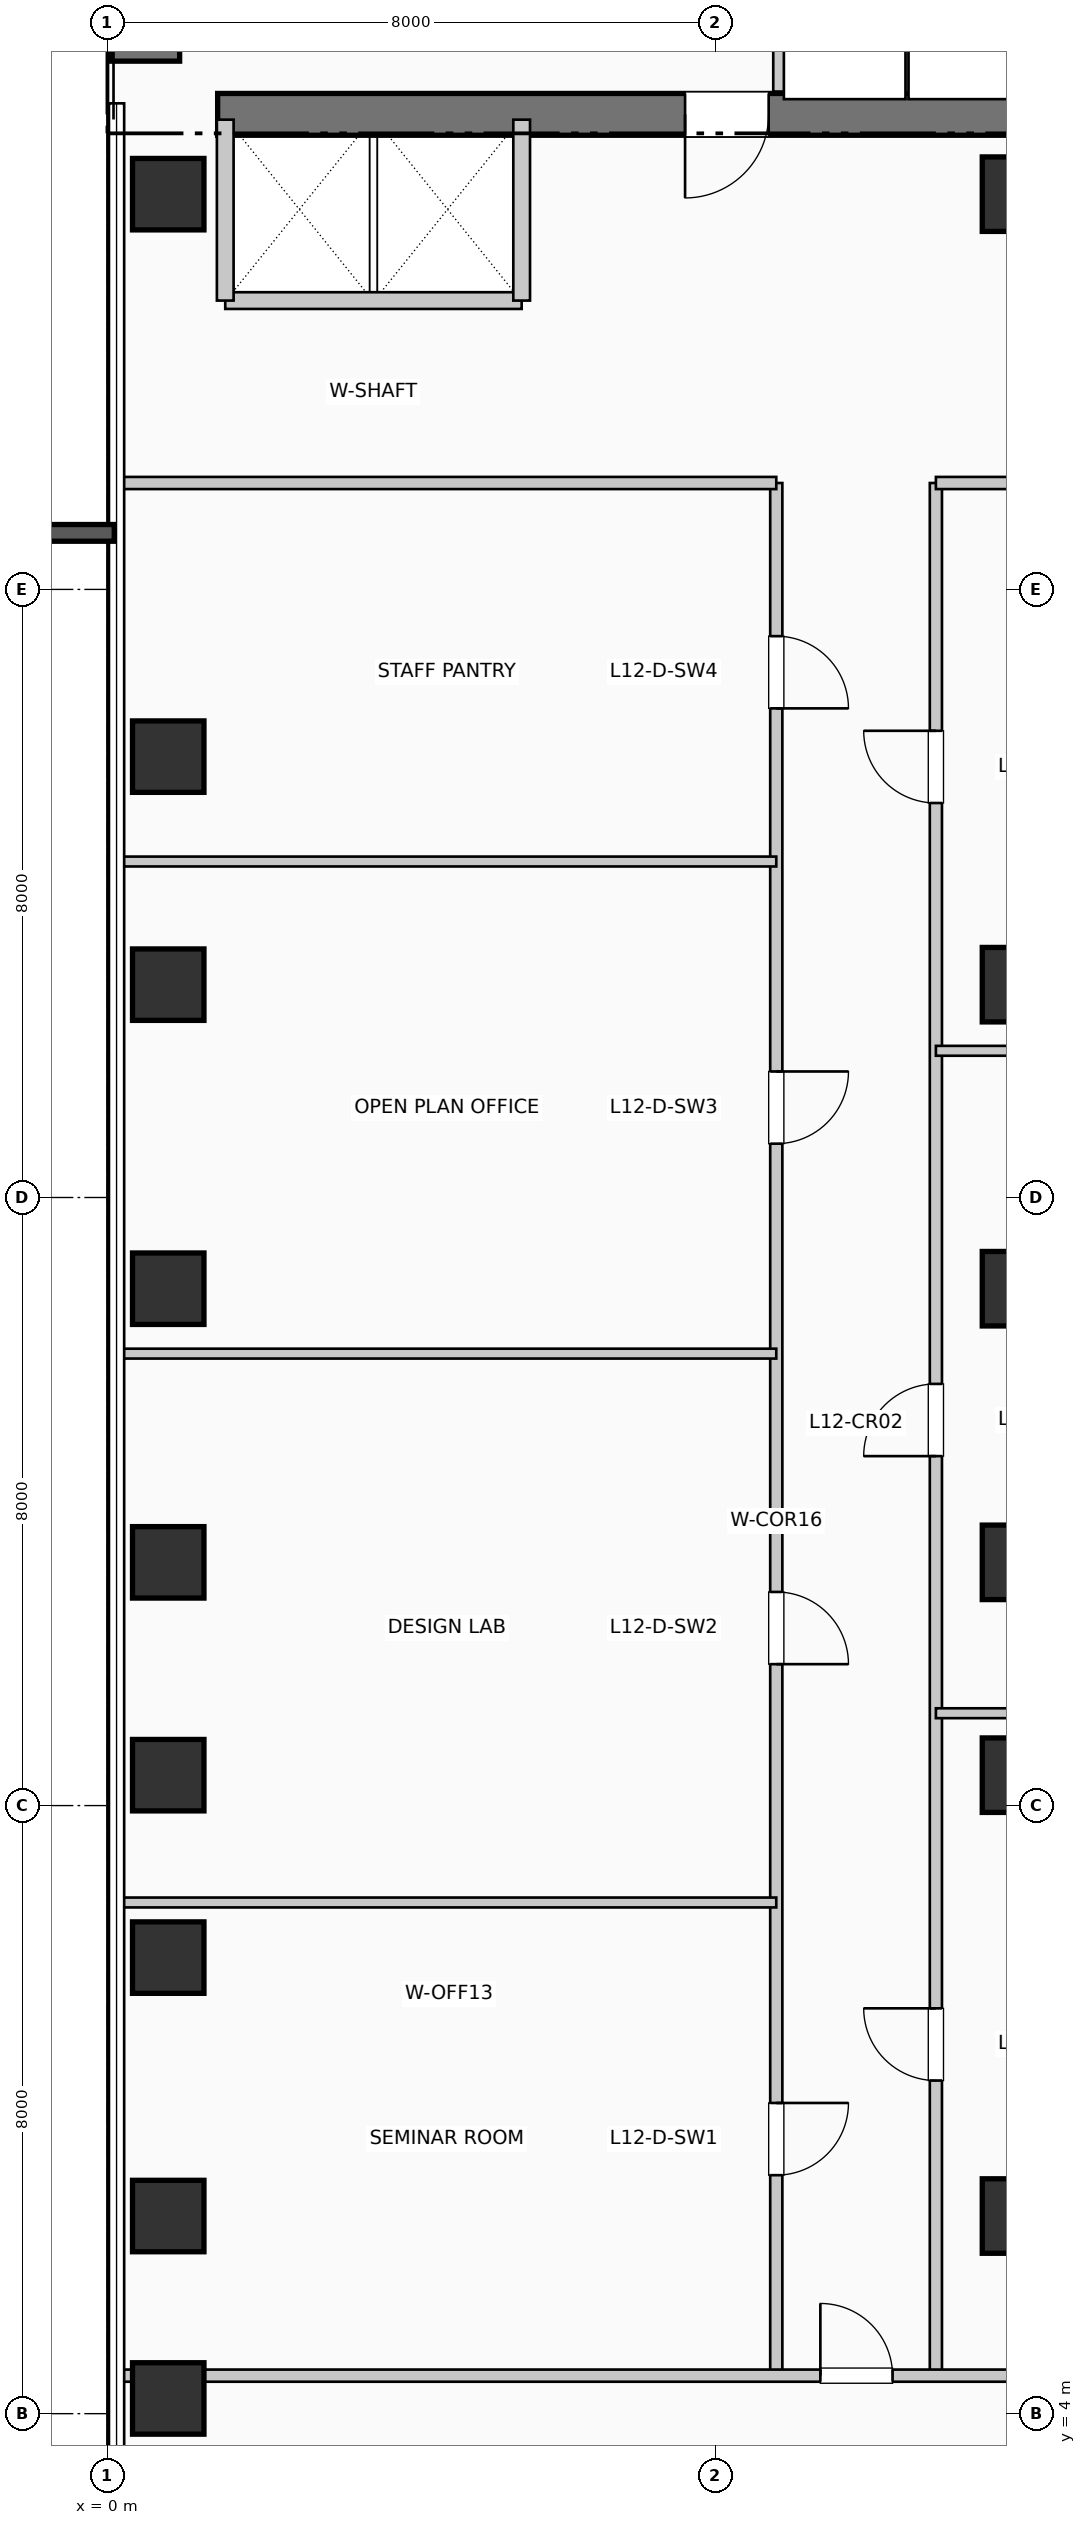
"""IFC4 building model, lengths in metres.
Left out: names, types, materials, properties, quantities, classifications, styles, units other than length and angle.
Written with IfcOpenShell. Run it as: python <this file> out.ifc"""

import sys

from ifc_helpers import new_model, si_unit, direction, frame, frame_2d, origin, origin_2d, place, context, subcontext, project, spatial, rectangle, extrude, element, fill, save


model = new_model("IFC4")
c1 = context("Model", 3, precision=1e-05, world=origin(), true_north=direction((0.0, 1.0)))
c2 = subcontext(c1, "Body", "Model", "MODEL_VIEW")
j1 = project(units=[si_unit("LENGTHUNIT", "METRE"), si_unit("PLANEANGLEUNIT", "RADIAN")], contexts=[c1])
p1 = place(None, origin())
s1 = spatial("IfcSite", under=j1, at=p1, CompositionType="ELEMENT")
p2 = place(p1, origin())
s2 = spatial("IfcBuilding", under=s1, at=p2, CompositionType="ELEMENT")
p3 = place(p2, frame((0.0, 0.0, 54.12)))
s3 = spatial("IfcBuildingStorey", under=s2, at=p3, CompositionType="ELEMENT", Elevation=54.12)
p4 = place(p3, frame((0.5, 34.95, 0.0), z_axis=(0.0, 0.0, 1.0), x_axis=(0.0, 1.0, 0.0)))
e1 = element("IfcWall", 1, at=p4, inside=s3, PredefinedType="SHEAR", context=c2, shape_type="SweptSolid", body=[
    extrude(rectangle(XDim=7.9, YDim=0.9, at=frame_2d((3.95, 0.0))), origin(), (0.0, 0.0, 1.0), 3.96),
])
p5 = place(p3, frame((1.45, 34.25, 0.0), z_axis=(0.0, 0.0, 1.0), x_axis=(1.0, 0.0, 0.0)))
e2 = element("IfcWall", 2, at=p5, inside=s3, PredefinedType="SHEAR", context=c2, shape_type="SweptSolid", body=[
    extrude(rectangle(XDim=10.71, YDim=0.55, at=frame_2d((5.355, 0.0))), origin(), (0.0, 0.0, 1.0), 3.96),
])
p6 = place(p5, frame((7.25, 0.0, 0.0), z_axis=(0.0, 0.0, 1.0), x_axis=(-1.0, 0.0, 0.0)))
e3 = element("IfcOpeningElement", 3, at=p6, cuts=e2, PredefinedType="OPENING", context=c2, shape_type="SweptSolid", body=[
    extrude(rectangle(XDim=1.1, YDim=2.15, at=frame_2d((0.55, 1.075))), frame((0.0, 0.285, 0.0), z_axis=(0.0, -1.0, 0.0), x_axis=(1.0, 0.0, 0.0)), (0.0, 0.0, 1.0), 0.57),
])
for number, where, z_axis, x_axis in (
    (4, (0.8, 4.2, 0.0), (0.0, 0.0, 1.0), (1.0, 0.0, 0.0)),
    (5, (0.8, 6.6, 0.0), (0.0, 0.0, 1.0), (1.0, 0.0, 0.0)),
    (6, (0.8, 10.0, 0.0), (0.0, 0.0, 1.0), (1.0, 0.0, 0.0)),
    (7, (0.8, 12.4, 0.0), (0.0, 0.0, 1.0), (1.0, 0.0, 0.0)),
    (8, (0.8, 15.2, 0.0), (0.0, 0.0, 1.0), (1.0, 0.0, 0.0)),
    (9, (0.8, 18.8, 0.0), (0.0, 0.0, 1.0), (1.0, 0.0, 0.0)),
    (10, (0.8, 22.8, 0.0), (0.0, 0.0, 1.0), (1.0, 0.0, 0.0)),
    (11, (0.8, 25.8, 0.0), (0.0, 0.0, 1.0), (1.0, 0.0, 0.0)),
    (12, (0.8, 33.2, 0.0), (0.0, 0.0, 1.0), (1.0, 0.0, 0.0)),
):
    element("IfcColumn", number, at=place(p3, frame(where, z_axis=z_axis, x_axis=x_axis)), inside=s3, PredefinedType="COLUMN", context=c2, shape_type="SweptSolid", body=[
        extrude(rectangle(XDim=0.94, YDim=0.94, at=origin_2d()), origin(), (0.0, 0.0, 1.0), 3.96),
    ])
for number, where, z_axis, x_axis in (
    (13, (12.0, 6.6, 0.0), (0.0, 0.0, 1.0), (1.0, 0.0, 0.0)),
    (14, (12.0, 12.4, 0.0), (0.0, 0.0, 1.0), (1.0, 0.0, 0.0)),
    (15, (12.0, 15.2, 0.0), (0.0, 0.0, 1.0), (1.0, 0.0, 0.0)),
    (16, (12.0, 18.8, 0.0), (0.0, 0.0, 1.0), (1.0, 0.0, 0.0)),
    (17, (12.0, 22.8, 0.0), (0.0, 0.0, 1.0), (1.0, 0.0, 0.0)),
    (18, (12.0, 33.2, 0.0), (0.0, 0.0, 1.0), (1.0, 0.0, 0.0)),
):
    element("IfcColumn", number, at=place(p3, frame(where, z_axis=z_axis, x_axis=x_axis)), inside=s3, PredefinedType="COLUMN", context=c2, shape_type="SweptSolid", body=[
        extrude(rectangle(XDim=0.98, YDim=0.98, at=origin_2d()), origin(), (0.0, 0.0, 1.0), 3.96),
    ])
p7 = place(p3, frame((8.86, 34.55, 0.0), z_axis=(0.0, 0.0, 1.0), x_axis=(0.0, 1.0, 0.0)))
e19 = element("IfcWall", 19, at=p7, inside=s3, PredefinedType="PARTITIONING", context=c2, shape_type="SweptSolid", body=[
    extrude(rectangle(XDim=2.5, YDim=0.2, at=frame_2d((1.25, 0.0))), origin(), (0.0, 0.0, 1.0), 3.71),
])
p8 = place(p3, frame((1.55, 31.8, 0.0), z_axis=(0.0, 0.0, 1.0), x_axis=(1.0, 0.0, 0.0)))
e20 = element("IfcWall", 20, at=p8, inside=s3, PredefinedType="PARTITIONING", context=c2, shape_type="SweptSolid", body=[
    extrude(rectangle(XDim=3.9, YDim=0.22, at=frame_2d((1.95, 0.0))), origin(), (0.0, 0.0, 1.0), 3.71),
])
for number, where, z_axis, x_axis in (
    (21, (1.55, 31.8, 0.0), (0.0, 0.0, 1.0), (0.0, 1.0, 0.0)),
    (22, (5.45, 31.8, 0.0), (0.0, 0.0, 1.0), (0.0, 1.0, 0.0)),
):
    element("IfcWall", number, at=place(p3, frame(where, z_axis=z_axis, x_axis=x_axis)), inside=s3, PredefinedType="PARTITIONING", context=c2, shape_type="SweptSolid", body=[
        extrude(rectangle(XDim=2.38, YDim=0.22, at=frame_2d((1.19, 0.0))), origin(), (0.0, 0.0, 1.0), 3.71),
    ])
p9 = place(p3, frame((8.8, 4.5, 0.0), z_axis=(0.0, 0.0, 1.0), x_axis=(0.0, 1.0, 0.0)))
e23 = element("IfcWall", 23, at=p9, inside=s3, PredefinedType="PARTITIONING", context=c2, shape_type="SweptSolid", body=[
    extrude(rectangle(XDim=24.9, YDim=0.16, at=frame_2d((12.45, 0.0))), origin(), (0.0, 0.0, 1.0), 3.71),
])
p10 = place(p9, frame((3.587, 0.0, 0.0), z_axis=(0.0, 0.0, 1.0), x_axis=(-1.0, 0.0, 0.0)))
e24 = element("IfcOpeningElement", 24, at=p10, cuts=e23, PredefinedType="OPENING", context=c2, shape_type="SweptSolid", body=[
    extrude(rectangle(XDim=0.95, YDim=2.15, at=frame_2d((0.475, 1.075))), frame((0.0, 0.09, 0.0), z_axis=(0.0, -1.0, 0.0), x_axis=(1.0, 0.0, 0.0)), (0.0, 0.0, 1.0), 0.18),
])
p11 = place(p9, frame((10.311, 0.0, 0.0), z_axis=(0.0, 0.0, 1.0), x_axis=(-1.0, 0.0, 0.0)))
e25 = element("IfcOpeningElement", 25, at=p11, cuts=e23, PredefinedType="OPENING", context=c2, shape_type="SweptSolid", body=[
    extrude(rectangle(XDim=0.95, YDim=2.15, at=frame_2d((0.475, 1.075))), frame((0.0, 0.09, 0.0), z_axis=(0.0, -1.0, 0.0), x_axis=(1.0, 0.0, 0.0)), (0.0, 0.0, 1.0), 0.18),
])
p12 = place(p9, frame((17.158, 0.0, 0.0), z_axis=(0.0, 0.0, 1.0), x_axis=(-1.0, 0.0, 0.0)))
e26 = element("IfcOpeningElement", 26, at=p12, cuts=e23, PredefinedType="OPENING", context=c2, shape_type="SweptSolid", body=[
    extrude(rectangle(XDim=0.95, YDim=2.15, at=frame_2d((0.475, 1.075))), frame((0.0, 0.09, 0.0), z_axis=(0.0, -1.0, 0.0), x_axis=(1.0, 0.0, 0.0)), (0.0, 0.0, 1.0), 0.18),
])
p13 = place(p9, frame((22.885, 0.0, 0.0), z_axis=(0.0, 0.0, 1.0), x_axis=(-1.0, 0.0, 0.0)))
e27 = element("IfcOpeningElement", 27, at=p13, cuts=e23, PredefinedType="OPENING", context=c2, shape_type="SweptSolid", body=[
    extrude(rectangle(XDim=0.95, YDim=2.15, at=frame_2d((0.475, 1.075))), frame((0.0, 0.09, 0.0), z_axis=(0.0, -1.0, 0.0), x_axis=(1.0, 0.0, 0.0)), (0.0, 0.0, 1.0), 0.18),
])
p14 = place(p3, frame((10.9, 4.5, 0.0), z_axis=(0.0, 0.0, 1.0), x_axis=(0.0, 1.0, 0.0)))
e28 = element("IfcWall", 28, at=p14, inside=s3, PredefinedType="PARTITIONING", context=c2, shape_type="SweptSolid", body=[
    extrude(rectangle(XDim=24.9, YDim=0.16, at=frame_2d((12.45, 0.0))), origin(), (0.0, 0.0, 1.0), 3.71),
])
p15 = place(p14, frame((3.883, 0.0, 0.0)))
e29 = element("IfcOpeningElement", 29, at=p15, cuts=e28, PredefinedType="OPENING", context=c2, shape_type="SweptSolid", body=[
    extrude(rectangle(XDim=0.95, YDim=2.15, at=frame_2d((0.475, 1.075))), frame((0.0, 0.09, 0.0), z_axis=(0.0, -1.0, 0.0), x_axis=(1.0, 0.0, 0.0)), (0.0, 0.0, 1.0), 0.18),
])
p16 = place(p14, frame((12.097, 0.0, 0.0)))
e30 = element("IfcOpeningElement", 30, at=p16, cuts=e28, PredefinedType="OPENING", context=c2, shape_type="SweptSolid", body=[
    extrude(rectangle(XDim=0.95, YDim=2.15, at=frame_2d((0.475, 1.075))), frame((0.0, 0.09, 0.0), z_axis=(0.0, -1.0, 0.0), x_axis=(1.0, 0.0, 0.0)), (0.0, 0.0, 1.0), 0.18),
])
p17 = place(p14, frame((20.69, 0.0, 0.0)))
e31 = element("IfcOpeningElement", 31, at=p17, cuts=e28, PredefinedType="OPENING", context=c2, shape_type="SweptSolid", body=[
    extrude(rectangle(XDim=0.95, YDim=2.15, at=frame_2d((0.475, 1.075))), frame((0.0, 0.09, 0.0), z_axis=(0.0, -1.0, 0.0), x_axis=(1.0, 0.0, 0.0)), (0.0, 0.0, 1.0), 0.18),
])
p18 = place(p3, frame((0.19, 4.5, 0.0), z_axis=(0.0, 0.0, 1.0), x_axis=(1.0, 0.0, 0.0)))
e32 = element("IfcWall", 32, at=p18, inside=s3, PredefinedType="PARTITIONING", context=c2, shape_type="SweptSolid", body=[
    extrude(rectangle(XDim=23.26, YDim=0.16, at=frame_2d((11.63, 0.0))), origin(), (0.0, 0.0, 1.0), 2.995),
])
p19 = place(p18, frame((9.19, 0.0, 0.0)))
e33 = element("IfcOpeningElement", 33, at=p19, cuts=e32, PredefinedType="OPENING", context=c2, shape_type="SweptSolid", body=[
    extrude(rectangle(XDim=0.95, YDim=2.15, at=frame_2d((0.475, 1.075))), frame((0.0, 0.09, 0.0), z_axis=(0.0, -1.0, 0.0), x_axis=(1.0, 0.0, 0.0)), (0.0, 0.0, 1.0), 0.18),
])
p20 = place(p3, frame((0.19, 29.4, 0.0), z_axis=(0.0, 0.0, 1.0), x_axis=(1.0, 0.0, 0.0)))
e34 = element("IfcWall", 34, at=p20, inside=s3, PredefinedType="PARTITIONING", context=c2, shape_type="SweptSolid", body=[
    extrude(rectangle(XDim=8.61, YDim=0.16, at=frame_2d((4.305, 0.0))), origin(), (0.0, 0.0, 1.0), 3.365),
])
p21 = place(p3, frame((10.9, 29.4, 0.0), z_axis=(0.0, 0.0, 1.0), x_axis=(1.0, 0.0, 0.0)))
e35 = element("IfcWall", 35, at=p21, inside=s3, PredefinedType="PARTITIONING", context=c2, shape_type="SweptSolid", body=[
    extrude(rectangle(XDim=12.55, YDim=0.16, at=frame_2d((6.275, 0.0))), origin(), (0.0, 0.0, 1.0), 3.365),
])
for number, where, z_axis, x_axis in (
    (36, (0.19, 10.725, 0.0), (0.0, 0.0, 1.0), (1.0, 0.0, 0.0)),
    (37, (0.19, 17.946, 0.0), (0.0, 0.0, 1.0), (1.0, 0.0, 0.0)),
    (38, (0.19, 24.42, 0.0), (0.0, 0.0, 1.0), (1.0, 0.0, 0.0)),
):
    element("IfcWall", number, at=place(p3, frame(where, z_axis=z_axis, x_axis=x_axis)), inside=s3, PredefinedType="PARTITIONING", context=c2, shape_type="SweptSolid", body=[
        extrude(rectangle(XDim=8.61, YDim=0.13, at=frame_2d((4.305, 0.0))), origin(), (0.0, 0.0, 1.0), 3.71),
    ])
for number, where, z_axis, x_axis in (
    (39, (10.9, 13.215, 0.0), (0.0, 0.0, 1.0), (1.0, 0.0, 0.0)),
    (40, (10.9, 21.93, 0.0), (0.0, 0.0, 1.0), (1.0, 0.0, 0.0)),
):
    element("IfcWall", number, at=place(p3, frame(where, z_axis=z_axis, x_axis=x_axis)), inside=s3, PredefinedType="PARTITIONING", context=c2, shape_type="SweptSolid", body=[
        extrude(rectangle(XDim=12.55, YDim=0.13, at=frame_2d((6.275, 0.0))), origin(), (0.0, 0.0, 1.0), 3.71),
    ])
p22 = place(p6, origin())
e41 = element("IfcDoor", 41, at=p22, inside=s3, OperationType="SINGLE_SWING_LEFT", PredefinedType="DOOR", context=c2, shape_type="SweptSolid", body=[
    extrude(rectangle(XDim=1.1, YDim=2.15, at=frame_2d((0.55, 1.075))), frame((0.0, 0.025, 0.0), z_axis=(0.0, -1.0, 0.0), x_axis=(1.0, 0.0, 0.0)), (0.0, 0.0, 1.0), 0.05),
])
fill(e3, e41)
p23 = place(p19, origin())
e42 = element("IfcDoor", 42, at=p23, inside=s3, OperationType="SINGLE_SWING_LEFT", PredefinedType="DOOR", context=c2, shape_type="SweptSolid", body=[
    extrude(rectangle(XDim=0.95, YDim=2.15, at=frame_2d((0.475, 1.075))), frame((0.0, 0.025, 0.0), z_axis=(0.0, -1.0, 0.0), x_axis=(1.0, 0.0, 0.0)), (0.0, 0.0, 1.0), 0.05),
])
fill(e33, e42)
p24 = place(p10, origin())
e43 = element("IfcDoor", 43, at=p24, inside=s3, OperationType="SINGLE_SWING_RIGHT", PredefinedType="DOOR", context=c2, shape_type="SweptSolid", body=[
    extrude(rectangle(XDim=0.95, YDim=2.15, at=frame_2d((0.475, 1.075))), frame((0.0, 0.025, 0.0), z_axis=(0.0, -1.0, 0.0), x_axis=(1.0, 0.0, 0.0)), (0.0, 0.0, 1.0), 0.05),
])
fill(e24, e43)
p25 = place(p11, origin())
e44 = element("IfcDoor", 44, at=p25, inside=s3, OperationType="SINGLE_SWING_LEFT", PredefinedType="DOOR", context=c2, shape_type="SweptSolid", body=[
    extrude(rectangle(XDim=0.95, YDim=2.15, at=frame_2d((0.475, 1.075))), frame((0.0, 0.025, 0.0), z_axis=(0.0, -1.0, 0.0), x_axis=(1.0, 0.0, 0.0)), (0.0, 0.0, 1.0), 0.05),
])
fill(e25, e44)
p26 = place(p12, origin())
e45 = element("IfcDoor", 45, at=p26, inside=s3, OperationType="SINGLE_SWING_RIGHT", PredefinedType="DOOR", context=c2, shape_type="SweptSolid", body=[
    extrude(rectangle(XDim=0.95, YDim=2.15, at=frame_2d((0.475, 1.075))), frame((0.0, 0.025, 0.0), z_axis=(0.0, -1.0, 0.0), x_axis=(1.0, 0.0, 0.0)), (0.0, 0.0, 1.0), 0.05),
])
fill(e26, e45)
p27 = place(p13, origin())
e46 = element("IfcDoor", 46, at=p27, inside=s3, OperationType="SINGLE_SWING_LEFT", PredefinedType="DOOR", context=c2, shape_type="SweptSolid", body=[
    extrude(rectangle(XDim=0.95, YDim=2.15, at=frame_2d((0.475, 1.075))), frame((0.0, 0.025, 0.0), z_axis=(0.0, -1.0, 0.0), x_axis=(1.0, 0.0, 0.0)), (0.0, 0.0, 1.0), 0.05),
])
fill(e27, e46)
p28 = place(p15, origin())
e47 = element("IfcDoor", 47, at=p28, inside=s3, OperationType="SINGLE_SWING_RIGHT", PredefinedType="DOOR", context=c2, shape_type="SweptSolid", body=[
    extrude(rectangle(XDim=0.95, YDim=2.15, at=frame_2d((0.475, 1.075))), frame((0.0, 0.025, 0.0), z_axis=(0.0, -1.0, 0.0), x_axis=(1.0, 0.0, 0.0)), (0.0, 0.0, 1.0), 0.05),
])
fill(e29, e47)
p29 = place(p16, origin())
e48 = element("IfcDoor", 48, at=p29, inside=s3, OperationType="SINGLE_SWING_LEFT", PredefinedType="DOOR", context=c2, shape_type="SweptSolid", body=[
    extrude(rectangle(XDim=0.95, YDim=2.15, at=frame_2d((0.475, 1.075))), frame((0.0, 0.025, 0.0), z_axis=(0.0, -1.0, 0.0), x_axis=(1.0, 0.0, 0.0)), (0.0, 0.0, 1.0), 0.05),
])
fill(e30, e48)
p30 = place(p17, origin())
e49 = element("IfcDoor", 49, at=p30, inside=s3, OperationType="SINGLE_SWING_RIGHT", PredefinedType="DOOR", context=c2, shape_type="SweptSolid", body=[
    extrude(rectangle(XDim=0.95, YDim=2.15, at=frame_2d((0.475, 1.075))), frame((0.0, 0.025, 0.0), z_axis=(0.0, -1.0, 0.0), x_axis=(1.0, 0.0, 0.0)), (0.0, 0.0, 1.0), 0.05),
])
fill(e31, e49)
save(model, sys.argv[1])
